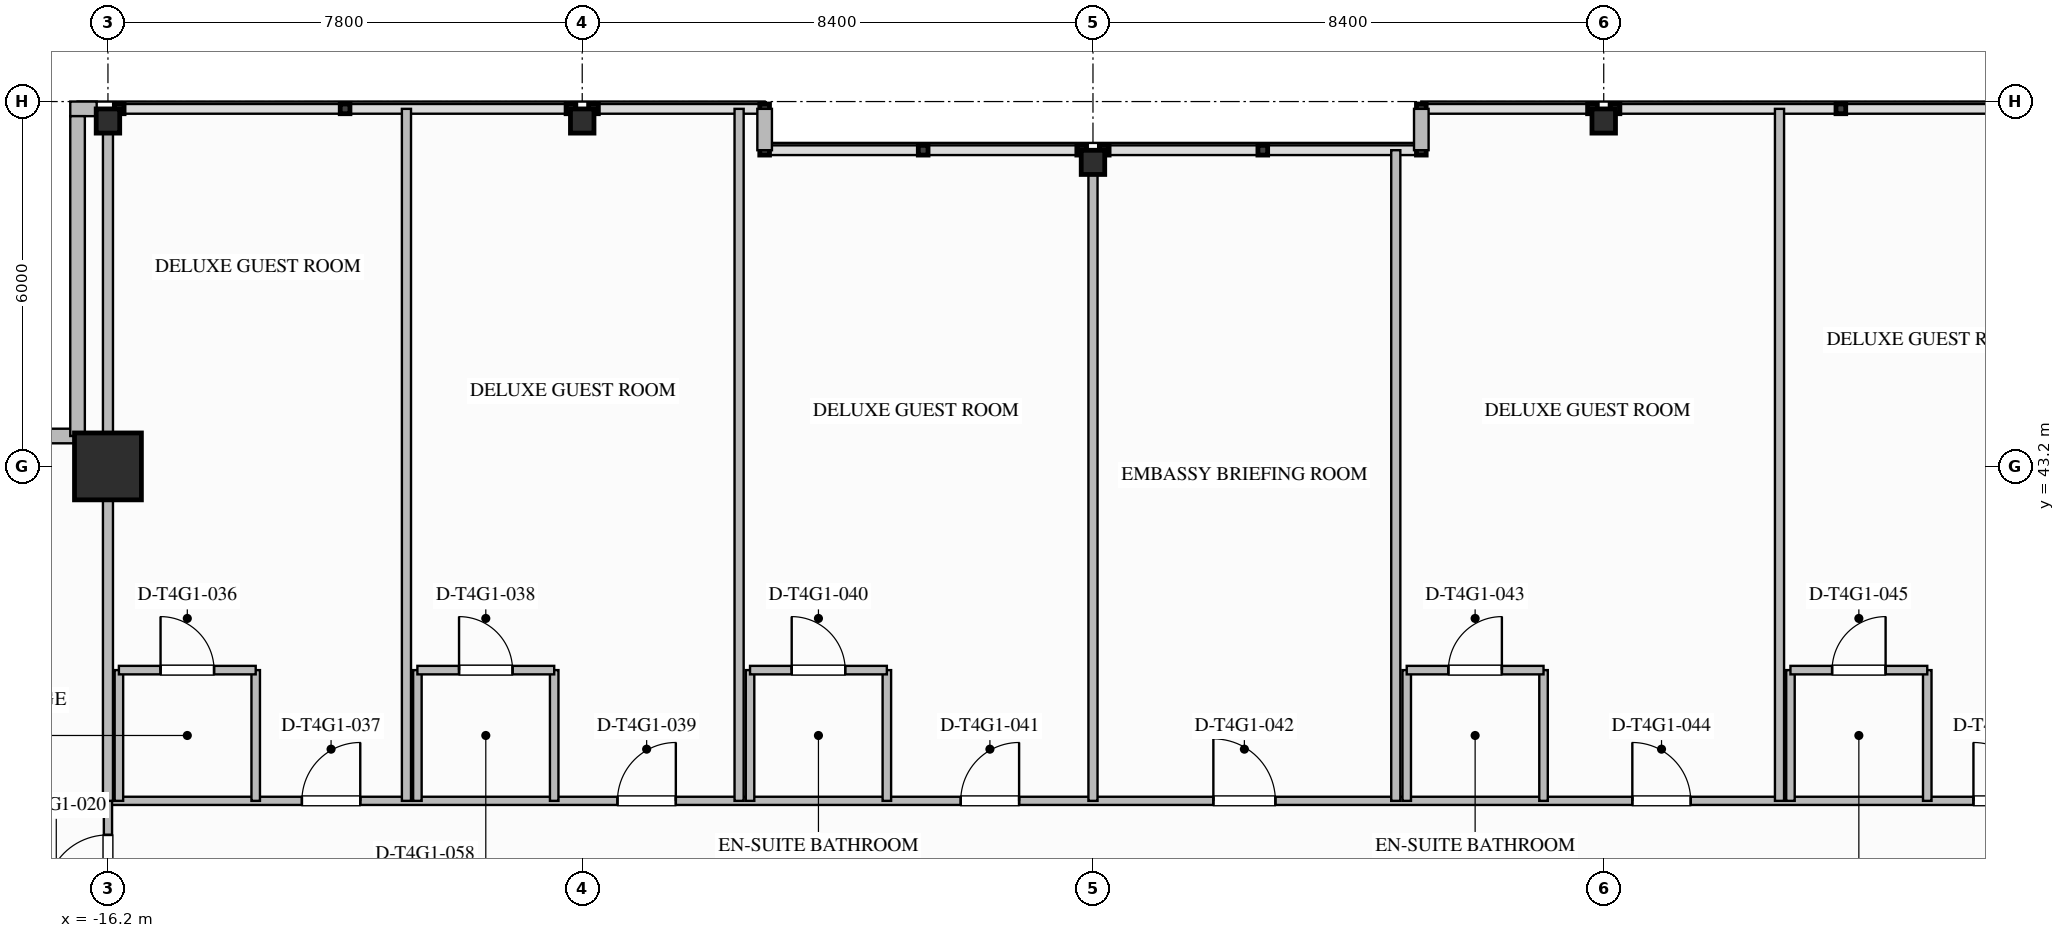
"""IFC4 building model, lengths in metres.
Left out: names, types, materials, properties, quantities, classifications, styles, units other than length and angle.
Written with IfcOpenShell. Run it as: python <this file> out.ifc"""

import sys

from ifc_helpers import new_model, si_unit, direction, frame, frame_2d, origin, origin_2d, place, context, subcontext, project, spatial, rectangle, i_section, extrude, element, fill, save


model = new_model("IFC4")
c1 = context("Model", 3, precision=1e-05, world=origin(), true_north=direction((0.0, 1.0)))
c2 = subcontext(c1, "Body", "Model", "MODEL_VIEW")
j1 = project(units=[si_unit("LENGTHUNIT", "METRE"), si_unit("PLANEANGLEUNIT", "RADIAN")], contexts=[c1])
p1 = place(None, origin())
s1 = spatial("IfcSite", under=j1, at=p1, CompositionType="ELEMENT")
p2 = place(p1, origin())
s2 = spatial("IfcBuilding", under=s1, at=p2, CompositionType="ELEMENT")
p3 = place(p2, frame((0.0, 0.0, 208.7)))
s3 = spatial("IfcBuildingStorey", under=s2, at=p3, CompositionType="ELEMENT", Elevation=208.7)
p4 = place(p3, frame((-16.2, 43.2, 0.0), z_axis=(0.0, 0.0, 1.0), x_axis=(1.0, 0.0, 0.0)))
e1 = element("IfcColumn", 1, at=p4, inside=s3, PredefinedType="COLUMN", context=c2, shape_type="SweptSolid", body=[
    extrude(rectangle(XDim=1.1, YDim=1.1, at=origin_2d()), origin(), (0.0, 0.0, 1.0), 3.6),
])
for number, where, z_axis, x_axis in (
    (2, (-16.2, 48.88, 0.0), (0.0, 0.0, 1.0), (0.0, 1.0, 0.0)),
    (3, (-8.4, 48.88, 0.0), (0.0, 0.0, 1.0), (0.0, 1.0, 0.0)),
    (4, (0.0, 48.2, 0.0), (0.0, 0.0, 1.0), (0.0, 1.0, 0.0)),
    (5, (8.4, 48.88, 0.0), (0.0, 0.0, 1.0), (0.0, 1.0, 0.0)),
):
    element("IfcColumn", number, at=place(p3, frame(where, z_axis=z_axis, x_axis=x_axis)), inside=s3, PredefinedType="COLUMN", context=c2, shape_type="SweptSolid", body=[
        extrude(i_section(OverallWidth=0.397, OverallDepth=0.387, WebThickness=0.021, FlangeThickness=0.033, FilletRadius=0.025, at=origin_2d()), origin(), (0.0, 0.0, 1.0), 3.597),
    ])
p5 = place(p3, frame((-16.82, 49.08, 0.0), z_axis=(0.0, 0.0, 1.0), x_axis=(1.0, 0.0, 0.0)))
e6 = element("IfcWall", 6, at=p5, inside=s3, PredefinedType="STANDARD", context=c2, shape_type="SweptSolid", body=[
    extrude(rectangle(XDim=0.435, YDim=0.24, at=frame_2d((0.217, 0.0))), origin(), (0.0, 0.0, 1.0), 3.34),
])
for number, where, z_axis, x_axis in (
    (7, (-21.96, 43.7, 0.0), (0.0, 0.0, 1.0), (1.0, 0.0, 0.0)),
    (8, (-16.7, 43.7, 0.0), (0.0, 0.0, 1.0), (0.0, 1.0, 0.0)),
):
    element("IfcWall", number, at=place(p3, frame(where, z_axis=z_axis, x_axis=x_axis)), inside=s3, PredefinedType="STANDARD", context=c2, shape_type="SweptSolid", body=[
        extrude(rectangle(XDim=5.26, YDim=0.24, at=frame_2d((2.63, 0.0))), origin(), (0.0, 0.0, 1.0), 3.34),
    ])
for number, where, z_axis, x_axis in (
    (9, (-5.4, 49.08, 0.0), (0.0, 0.0, 1.0), (0.0, -1.0, 0.0)),
    (10, (5.4, 48.4, 0.0), (0.0, 0.0, 1.0), (0.0, 1.0, 0.0)),
):
    element("IfcWall", number, at=place(p3, frame(where, z_axis=z_axis, x_axis=x_axis)), inside=s3, PredefinedType="STANDARD", context=c2, shape_type="SweptSolid", body=[
        extrude(rectangle(XDim=0.68, YDim=0.24, at=frame_2d((0.34, 0.0))), origin(), (0.0, 0.0, 1.0), 3.34),
    ])
p6 = place(p3, frame((-16.2, 37.7, 0.0), z_axis=(0.0, 0.0, 1.0), x_axis=(1.0, 0.0, 0.0)))
e11 = element("IfcWall", 11, at=p6, inside=s3, PredefinedType="PARTITIONING", context=c2, shape_type="SweptSolid", body=[
    extrude(rectangle(XDim=38.28, YDim=0.135, at=frame_2d((19.14, 0.0))), origin(), (0.0, 0.0, 1.0), 3.34),
])
p7 = place(p6, frame((35.785, 0.0, 0.0)))
e12 = element("IfcOpeningElement", 12, at=p7, cuts=e11, PredefinedType="OPENING", context=c2, shape_type="SweptSolid", body=[
    extrude(rectangle(XDim=1.26, YDim=2.2, at=frame_2d((0.63, 1.1))), frame((0.0, 0.077, 0.0), z_axis=(0.0, -1.0, 0.0), x_axis=(1.0, 0.0, 0.0)), (0.0, 0.0, 1.0), 0.155),
])
p8 = place(p6, frame((3.189, 0.0, 0.0)))
e13 = element("IfcOpeningElement", 13, at=p8, cuts=e11, PredefinedType="OPENING", context=c2, shape_type="SweptSolid", body=[
    extrude(rectangle(XDim=0.96, YDim=2.15, at=frame_2d((0.48, 1.075))), frame((0.0, 0.077, 0.0), z_axis=(0.0, -1.0, 0.0), x_axis=(1.0, 0.0, 0.0)), (0.0, 0.0, 1.0), 0.155),
])
p9 = place(p6, frame((8.379, 0.0, 0.0)))
e14 = element("IfcOpeningElement", 14, at=p9, cuts=e11, PredefinedType="OPENING", context=c2, shape_type="SweptSolid", body=[
    extrude(rectangle(XDim=0.96, YDim=2.15, at=frame_2d((0.48, 1.075))), frame((0.0, 0.077, 0.0), z_axis=(0.0, -1.0, 0.0), x_axis=(1.0, 0.0, 0.0)), (0.0, 0.0, 1.0), 0.155),
])
p10 = place(p6, frame((14.025, 0.0, 0.0)))
e15 = element("IfcOpeningElement", 15, at=p10, cuts=e11, PredefinedType="OPENING", context=c2, shape_type="SweptSolid", body=[
    extrude(rectangle(XDim=0.96, YDim=2.15, at=frame_2d((0.48, 1.075))), frame((0.0, 0.077, 0.0), z_axis=(0.0, -1.0, 0.0), x_axis=(1.0, 0.0, 0.0)), (0.0, 0.0, 1.0), 0.155),
])
p11 = place(p6, frame((18.18, 0.0, 0.0)))
e16 = element("IfcOpeningElement", 16, at=p11, cuts=e11, PredefinedType="OPENING", context=c2, shape_type="SweptSolid", body=[
    extrude(rectangle(XDim=1.02, YDim=2.15, at=frame_2d((0.51, 1.075))), frame((0.0, 0.077, 0.0), z_axis=(0.0, -1.0, 0.0), x_axis=(1.0, 0.0, 0.0)), (0.0, 0.0, 1.0), 0.155),
])
p12 = place(p6, frame((25.071, 0.0, 0.0)))
e17 = element("IfcOpeningElement", 17, at=p12, cuts=e11, PredefinedType="OPENING", context=c2, shape_type="SweptSolid", body=[
    extrude(rectangle(XDim=0.96, YDim=2.15, at=frame_2d((0.48, 1.075))), frame((0.0, 0.077, 0.0), z_axis=(0.0, -1.0, 0.0), x_axis=(1.0, 0.0, 0.0)), (0.0, 0.0, 1.0), 0.155),
])
p13 = place(p6, frame((30.68, 0.0, 0.0)))
e18 = element("IfcOpeningElement", 18, at=p13, cuts=e11, PredefinedType="OPENING", context=c2, shape_type="SweptSolid", body=[
    extrude(rectangle(XDim=0.96, YDim=2.15, at=frame_2d((0.48, 1.075))), frame((0.0, 0.077, 0.0), z_axis=(0.0, -1.0, 0.0), x_axis=(1.0, 0.0, 0.0)), (0.0, 0.0, 1.0), 0.155),
])
p14 = place(p3, frame((-16.2, 35.6, 0.0), z_axis=(0.0, 0.0, 1.0), x_axis=(0.0, 1.0, 0.0)))
e19 = element("IfcWall", 19, at=p14, inside=s3, PredefinedType="PARTITIONING", context=c2, shape_type="SweptSolid", body=[
    extrude(rectangle(XDim=2.1, YDim=0.135, at=frame_2d((1.05, 0.0))), origin(), (0.0, 0.0, 1.0), 2.714),
])
p15 = place(p14, frame((0.52, 0.0, 0.0)))
e20 = element("IfcOpeningElement", 20, at=p15, cuts=e19, PredefinedType="OPENING", context=c2, shape_type="SweptSolid", body=[
    extrude(rectangle(XDim=1.02, YDim=2.15, at=frame_2d((0.51, 1.075))), frame((0.0, 0.077, 0.0), z_axis=(0.0, -1.0, 0.0), x_axis=(1.0, 0.0, 0.0)), (0.0, 0.0, 1.0), 0.155),
])
p16 = place(p3, frame((-16.2, 37.7, 0.0), z_axis=(0.0, 0.0, 1.0), x_axis=(0.0, 1.0, 0.0)))
e21 = element("IfcWall", 21, at=p16, inside=s3, PredefinedType="PARTITIONING", context=c2, shape_type="SweptSolid", body=[
    extrude(rectangle(XDim=11.38, YDim=0.165, at=frame_2d((5.69, 0.0))), origin(), (0.0, 0.0, 1.0), 2.714),
])
p17 = place(p3, frame((-16.02, 37.7, 0.0), z_axis=(0.0, 0.0, 1.0), x_axis=(0.0, 1.0, 0.0)))
e22 = element("IfcWall", 22, at=p17, inside=s3, PredefinedType="PLUMBINGWALL", context=c2, shape_type="SweptSolid", body=[
    extrude(rectangle(XDim=2.15, YDim=0.14, at=frame_2d((1.075, 0.0))), origin(), (0.0, 0.0, 1.0), 2.714),
])
p18 = place(p3, frame((-13.77, 37.7, 0.0), z_axis=(0.0, 0.0, 1.0), x_axis=(0.0, 1.0, 0.0)))
e23 = element("IfcWall", 23, at=p18, inside=s3, PredefinedType="PLUMBINGWALL", context=c2, shape_type="SweptSolid", body=[
    extrude(rectangle(XDim=2.15, YDim=0.14, at=frame_2d((1.075, 0.0))), origin(), (0.0, 0.0, 1.0), 3.34),
])
p19 = place(p3, frame((-16.02, 39.85, 0.0), z_axis=(0.0, 0.0, 1.0), x_axis=(1.0, 0.0, 0.0)))
e24 = element("IfcWall", 24, at=p19, inside=s3, PredefinedType="PLUMBINGWALL", context=c2, shape_type="SweptSolid", body=[
    extrude(rectangle(XDim=2.25, YDim=0.14, at=frame_2d((1.125, 0.0))), origin(), (0.0, 0.0, 1.0), 3.34),
])
p20 = place(p19, frame((0.685, 0.0, 0.0)))
e25 = element("IfcOpeningElement", 25, at=p20, cuts=e24, PredefinedType="OPENING", context=c2, shape_type="SweptSolid", body=[
    extrude(rectangle(XDim=0.88, YDim=2.1, at=frame_2d((0.44, 1.05))), frame((0.0, 0.08, 0.0), z_axis=(0.0, -1.0, 0.0), x_axis=(1.0, 0.0, 0.0)), (0.0, 0.0, 1.0), 0.16),
])
p21 = place(p3, frame((-11.291, 37.7, 0.0), z_axis=(0.0, 0.0, 1.0), x_axis=(0.0, 1.0, 0.0)))
e26 = element("IfcWall", 26, at=p21, inside=s3, PredefinedType="PARTITIONING", context=c2, shape_type="SweptSolid", body=[
    extrude(rectangle(XDim=11.38, YDim=0.15, at=frame_2d((5.69, 0.0))), origin(), (0.0, 0.0, 1.0), 3.34),
])
for number, where, z_axis, x_axis in (
    (27, (-11.111, 37.7, 0.0), (0.0, 0.0, 1.0), (0.0, 1.0, 0.0)),
    (28, (-8.861, 37.7, 0.0), (0.0, 0.0, 1.0), (0.0, 1.0, 0.0)),
):
    element("IfcWall", number, at=place(p3, frame(where, z_axis=z_axis, x_axis=x_axis)), inside=s3, PredefinedType="PLUMBINGWALL", context=c2, shape_type="SweptSolid", body=[
        extrude(rectangle(XDim=2.15, YDim=0.14, at=frame_2d((1.075, 0.0))), origin(), (0.0, 0.0, 1.0), 3.34),
    ])
p22 = place(p3, frame((-11.111, 39.85, 0.0), z_axis=(0.0, 0.0, 1.0), x_axis=(1.0, 0.0, 0.0)))
e29 = element("IfcWall", 29, at=p22, inside=s3, PredefinedType="PLUMBINGWALL", context=c2, shape_type="SweptSolid", body=[
    extrude(rectangle(XDim=2.25, YDim=0.14, at=frame_2d((1.125, 0.0))), origin(), (0.0, 0.0, 1.0), 3.34),
])
p23 = place(p22, frame((0.685, 0.0, 0.0)))
e30 = element("IfcOpeningElement", 30, at=p23, cuts=e29, PredefinedType="OPENING", context=c2, shape_type="SweptSolid", body=[
    extrude(rectangle(XDim=0.88, YDim=2.1, at=frame_2d((0.44, 1.05))), frame((0.0, 0.08, 0.0), z_axis=(0.0, -1.0, 0.0), x_axis=(1.0, 0.0, 0.0)), (0.0, 0.0, 1.0), 0.16),
])
p24 = place(p3, frame((-5.82, 37.7, 0.0), z_axis=(0.0, 0.0, 1.0), x_axis=(0.0, 1.0, 0.0)))
e31 = element("IfcWall", 31, at=p24, inside=s3, PredefinedType="PARTITIONING", context=c2, shape_type="SweptSolid", body=[
    extrude(rectangle(XDim=11.38, YDim=0.15, at=frame_2d((5.69, 0.0))), origin(), (0.0, 0.0, 1.0), 3.34),
])
for number, where, z_axis, x_axis in (
    (32, (-5.64, 37.7, 0.0), (0.0, 0.0, 1.0), (0.0, 1.0, 0.0)),
    (33, (-3.39, 37.7, 0.0), (0.0, 0.0, 1.0), (0.0, 1.0, 0.0)),
):
    element("IfcWall", number, at=place(p3, frame(where, z_axis=z_axis, x_axis=x_axis)), inside=s3, PredefinedType="PLUMBINGWALL", context=c2, shape_type="SweptSolid", body=[
        extrude(rectangle(XDim=2.15, YDim=0.14, at=frame_2d((1.075, 0.0))), origin(), (0.0, 0.0, 1.0), 3.34),
    ])
p25 = place(p3, frame((-5.64, 39.85, 0.0), z_axis=(0.0, 0.0, 1.0), x_axis=(1.0, 0.0, 0.0)))
e34 = element("IfcWall", 34, at=p25, inside=s3, PredefinedType="PLUMBINGWALL", context=c2, shape_type="SweptSolid", body=[
    extrude(rectangle(XDim=2.25, YDim=0.14, at=frame_2d((1.125, 0.0))), origin(), (0.0, 0.0, 1.0), 3.34),
])
p26 = place(p25, frame((0.685, 0.0, 0.0)))
e35 = element("IfcOpeningElement", 35, at=p26, cuts=e34, PredefinedType="OPENING", context=c2, shape_type="SweptSolid", body=[
    extrude(rectangle(XDim=0.88, YDim=2.1, at=frame_2d((0.44, 1.05))), frame((0.0, 0.08, 0.0), z_axis=(0.0, -1.0, 0.0), x_axis=(1.0, 0.0, 0.0)), (0.0, 0.0, 1.0), 0.16),
])
p27 = place(p3, frame((0.0, 37.7, 0.0), z_axis=(0.0, 0.0, 1.0), x_axis=(0.0, 1.0, 0.0)))
e36 = element("IfcWall", 36, at=p27, inside=s3, PredefinedType="PARTITIONING", context=c2, shape_type="SweptSolid", body=[
    extrude(rectangle(XDim=10.7, YDim=0.15, at=frame_2d((5.35, 0.0))), origin(), (0.0, 0.0, 1.0), 2.718),
])
p28 = place(p3, frame((4.98, 37.7, 0.0), z_axis=(0.0, 0.0, 1.0), x_axis=(0.0, 1.0, 0.0)))
e37 = element("IfcWall", 37, at=p28, inside=s3, PredefinedType="PARTITIONING", context=c2, shape_type="SweptSolid", body=[
    extrude(rectangle(XDim=10.7, YDim=0.15, at=frame_2d((5.35, 0.0))), origin(), (0.0, 0.0, 1.0), 3.34),
])
for number, where, z_axis, x_axis in (
    (38, (5.16, 37.7, 0.0), (0.0, 0.0, 1.0), (0.0, 1.0, 0.0)),
    (39, (7.41, 37.7, 0.0), (0.0, 0.0, 1.0), (0.0, 1.0, 0.0)),
):
    element("IfcWall", number, at=place(p3, frame(where, z_axis=z_axis, x_axis=x_axis)), inside=s3, PredefinedType="PLUMBINGWALL", context=c2, shape_type="SweptSolid", body=[
        extrude(rectangle(XDim=2.15, YDim=0.14, at=frame_2d((1.075, 0.0))), origin(), (0.0, 0.0, 1.0), 3.34),
    ])
p29 = place(p3, frame((5.16, 39.85, 0.0), z_axis=(0.0, 0.0, 1.0), x_axis=(1.0, 0.0, 0.0)))
e40 = element("IfcWall", 40, at=p29, inside=s3, PredefinedType="PLUMBINGWALL", context=c2, shape_type="SweptSolid", body=[
    extrude(rectangle(XDim=2.25, YDim=0.14, at=frame_2d((1.125, 0.0))), origin(), (0.0, 0.0, 1.0), 3.34),
])
p30 = place(p29, frame((0.685, 0.0, 0.0)))
e41 = element("IfcOpeningElement", 41, at=p30, cuts=e40, PredefinedType="OPENING", context=c2, shape_type="SweptSolid", body=[
    extrude(rectangle(XDim=0.88, YDim=2.1, at=frame_2d((0.44, 1.05))), frame((0.0, 0.08, 0.0), z_axis=(0.0, -1.0, 0.0), x_axis=(1.0, 0.0, 0.0)), (0.0, 0.0, 1.0), 0.16),
])
p31 = place(p3, frame((11.291, 37.7, 0.0), z_axis=(0.0, 0.0, 1.0), x_axis=(0.0, 1.0, 0.0)))
e42 = element("IfcWall", 42, at=p31, inside=s3, PredefinedType="PARTITIONING", context=c2, shape_type="SweptSolid", body=[
    extrude(rectangle(XDim=11.38, YDim=0.15, at=frame_2d((5.69, 0.0))), origin(), (0.0, 0.0, 1.0), 3.34),
])
for number, where, z_axis, x_axis in (
    (43, (11.471, 37.7, 0.0), (0.0, 0.0, 1.0), (0.0, 1.0, 0.0)),
    (44, (13.721, 37.7, 0.0), (0.0, 0.0, 1.0), (0.0, 1.0, 0.0)),
):
    element("IfcWall", number, at=place(p3, frame(where, z_axis=z_axis, x_axis=x_axis)), inside=s3, PredefinedType="PLUMBINGWALL", context=c2, shape_type="SweptSolid", body=[
        extrude(rectangle(XDim=2.15, YDim=0.14, at=frame_2d((1.075, 0.0))), origin(), (0.0, 0.0, 1.0), 3.34),
    ])
p32 = place(p3, frame((11.471, 39.85, 0.0), z_axis=(0.0, 0.0, 1.0), x_axis=(1.0, 0.0, 0.0)))
e45 = element("IfcWall", 45, at=p32, inside=s3, PredefinedType="PLUMBINGWALL", context=c2, shape_type="SweptSolid", body=[
    extrude(rectangle(XDim=2.25, YDim=0.14, at=frame_2d((1.125, 0.0))), origin(), (0.0, 0.0, 1.0), 3.34),
])
p33 = place(p32, frame((0.685, 0.0, 0.0)))
e46 = element("IfcOpeningElement", 46, at=p33, cuts=e45, PredefinedType="OPENING", context=c2, shape_type="SweptSolid", body=[
    extrude(rectangle(XDim=0.88, YDim=2.1, at=frame_2d((0.44, 1.05))), frame((0.0, 0.08, 0.0), z_axis=(0.0, -1.0, 0.0), x_axis=(1.0, 0.0, 0.0)), (0.0, 0.0, 1.0), 0.16),
])
p34 = place(p15, origin())
e47 = element("IfcDoor", 47, at=p34, inside=s3, OperationType="SINGLE_SWING_LEFT", PredefinedType="DOOR", context=c2, shape_type="SweptSolid", body=[
    extrude(rectangle(XDim=1.02, YDim=2.15, at=frame_2d((0.51, 1.075))), frame((0.0, 0.025, 0.0), z_axis=(0.0, -1.0, 0.0), x_axis=(1.0, 0.0, 0.0)), (0.0, 0.0, 1.0), 0.05),
])
fill(e20, e47)
p35 = place(p20, origin())
e48 = element("IfcDoor", 48, at=p35, inside=s3, OperationType="SINGLE_SWING_LEFT", PredefinedType="DOOR", context=c2, shape_type="SweptSolid", body=[
    extrude(rectangle(XDim=0.88, YDim=2.1, at=frame_2d((0.44, 1.05))), frame((0.0, 0.025, 0.0), z_axis=(0.0, -1.0, 0.0), x_axis=(1.0, 0.0, 0.0)), (0.0, 0.0, 1.0), 0.05),
])
fill(e25, e48)
p36 = place(p8, origin())
e49 = element("IfcDoor", 49, at=p36, inside=s3, OperationType="SINGLE_SWING_RIGHT", PredefinedType="DOOR", context=c2, shape_type="SweptSolid", body=[
    extrude(rectangle(XDim=0.96, YDim=2.15, at=frame_2d((0.48, 1.075))), frame((0.0, 0.025, 0.0), z_axis=(0.0, -1.0, 0.0), x_axis=(1.0, 0.0, 0.0)), (0.0, 0.0, 1.0), 0.05),
])
fill(e13, e49)
p37 = place(p23, origin())
e50 = element("IfcDoor", 50, at=p37, inside=s3, OperationType="SINGLE_SWING_LEFT", PredefinedType="DOOR", context=c2, shape_type="SweptSolid", body=[
    extrude(rectangle(XDim=0.88, YDim=2.1, at=frame_2d((0.44, 1.05))), frame((0.0, 0.025, 0.0), z_axis=(0.0, -1.0, 0.0), x_axis=(1.0, 0.0, 0.0)), (0.0, 0.0, 1.0), 0.05),
])
fill(e30, e50)
p38 = place(p9, origin())
e51 = element("IfcDoor", 51, at=p38, inside=s3, OperationType="SINGLE_SWING_RIGHT", PredefinedType="DOOR", context=c2, shape_type="SweptSolid", body=[
    extrude(rectangle(XDim=0.96, YDim=2.15, at=frame_2d((0.48, 1.075))), frame((0.0, 0.025, 0.0), z_axis=(0.0, -1.0, 0.0), x_axis=(1.0, 0.0, 0.0)), (0.0, 0.0, 1.0), 0.05),
])
fill(e14, e51)
p39 = place(p26, origin())
e52 = element("IfcDoor", 52, at=p39, inside=s3, OperationType="SINGLE_SWING_LEFT", PredefinedType="DOOR", context=c2, shape_type="SweptSolid", body=[
    extrude(rectangle(XDim=0.88, YDim=2.1, at=frame_2d((0.44, 1.05))), frame((0.0, 0.025, 0.0), z_axis=(0.0, -1.0, 0.0), x_axis=(1.0, 0.0, 0.0)), (0.0, 0.0, 1.0), 0.05),
])
fill(e35, e52)
p40 = place(p10, origin())
e53 = element("IfcDoor", 53, at=p40, inside=s3, OperationType="SINGLE_SWING_RIGHT", PredefinedType="DOOR", context=c2, shape_type="SweptSolid", body=[
    extrude(rectangle(XDim=0.96, YDim=2.15, at=frame_2d((0.48, 1.075))), frame((0.0, 0.025, 0.0), z_axis=(0.0, -1.0, 0.0), x_axis=(1.0, 0.0, 0.0)), (0.0, 0.0, 1.0), 0.05),
])
fill(e15, e53)
p41 = place(p11, origin())
e54 = element("IfcDoor", 54, at=p41, inside=s3, OperationType="SINGLE_SWING_LEFT", PredefinedType="DOOR", context=c2, shape_type="SweptSolid", body=[
    extrude(rectangle(XDim=1.02, YDim=2.15, at=frame_2d((0.51, 1.075))), frame((0.0, 0.025, 0.0), z_axis=(0.0, -1.0, 0.0), x_axis=(1.0, 0.0, 0.0)), (0.0, 0.0, 1.0), 0.05),
])
fill(e16, e54)
p42 = place(p30, origin())
e55 = element("IfcDoor", 55, at=p42, inside=s3, OperationType="SINGLE_SWING_RIGHT", PredefinedType="DOOR", context=c2, shape_type="SweptSolid", body=[
    extrude(rectangle(XDim=0.88, YDim=2.1, at=frame_2d((0.44, 1.05))), frame((0.0, 0.025, 0.0), z_axis=(0.0, -1.0, 0.0), x_axis=(1.0, 0.0, 0.0)), (0.0, 0.0, 1.0), 0.05),
])
fill(e41, e55)
p43 = place(p12, origin())
e56 = element("IfcDoor", 56, at=p43, inside=s3, OperationType="SINGLE_SWING_LEFT", PredefinedType="DOOR", context=c2, shape_type="SweptSolid", body=[
    extrude(rectangle(XDim=0.96, YDim=2.15, at=frame_2d((0.48, 1.075))), frame((0.0, 0.025, 0.0), z_axis=(0.0, -1.0, 0.0), x_axis=(1.0, 0.0, 0.0)), (0.0, 0.0, 1.0), 0.05),
])
fill(e17, e56)
p44 = place(p33, origin())
e57 = element("IfcDoor", 57, at=p44, inside=s3, OperationType="SINGLE_SWING_RIGHT", PredefinedType="DOOR", context=c2, shape_type="SweptSolid", body=[
    extrude(rectangle(XDim=0.88, YDim=2.1, at=frame_2d((0.44, 1.05))), frame((0.0, 0.025, 0.0), z_axis=(0.0, -1.0, 0.0), x_axis=(1.0, 0.0, 0.0)), (0.0, 0.0, 1.0), 0.05),
])
fill(e46, e57)
p45 = place(p13, origin())
e58 = element("IfcDoor", 58, at=p45, inside=s3, OperationType="SINGLE_SWING_LEFT", PredefinedType="DOOR", context=c2, shape_type="SweptSolid", body=[
    extrude(rectangle(XDim=0.96, YDim=2.15, at=frame_2d((0.48, 1.075))), frame((0.0, 0.025, 0.0), z_axis=(0.0, -1.0, 0.0), x_axis=(1.0, 0.0, 0.0)), (0.0, 0.0, 1.0), 0.05),
])
fill(e18, e58)
save(model, sys.argv[1])
